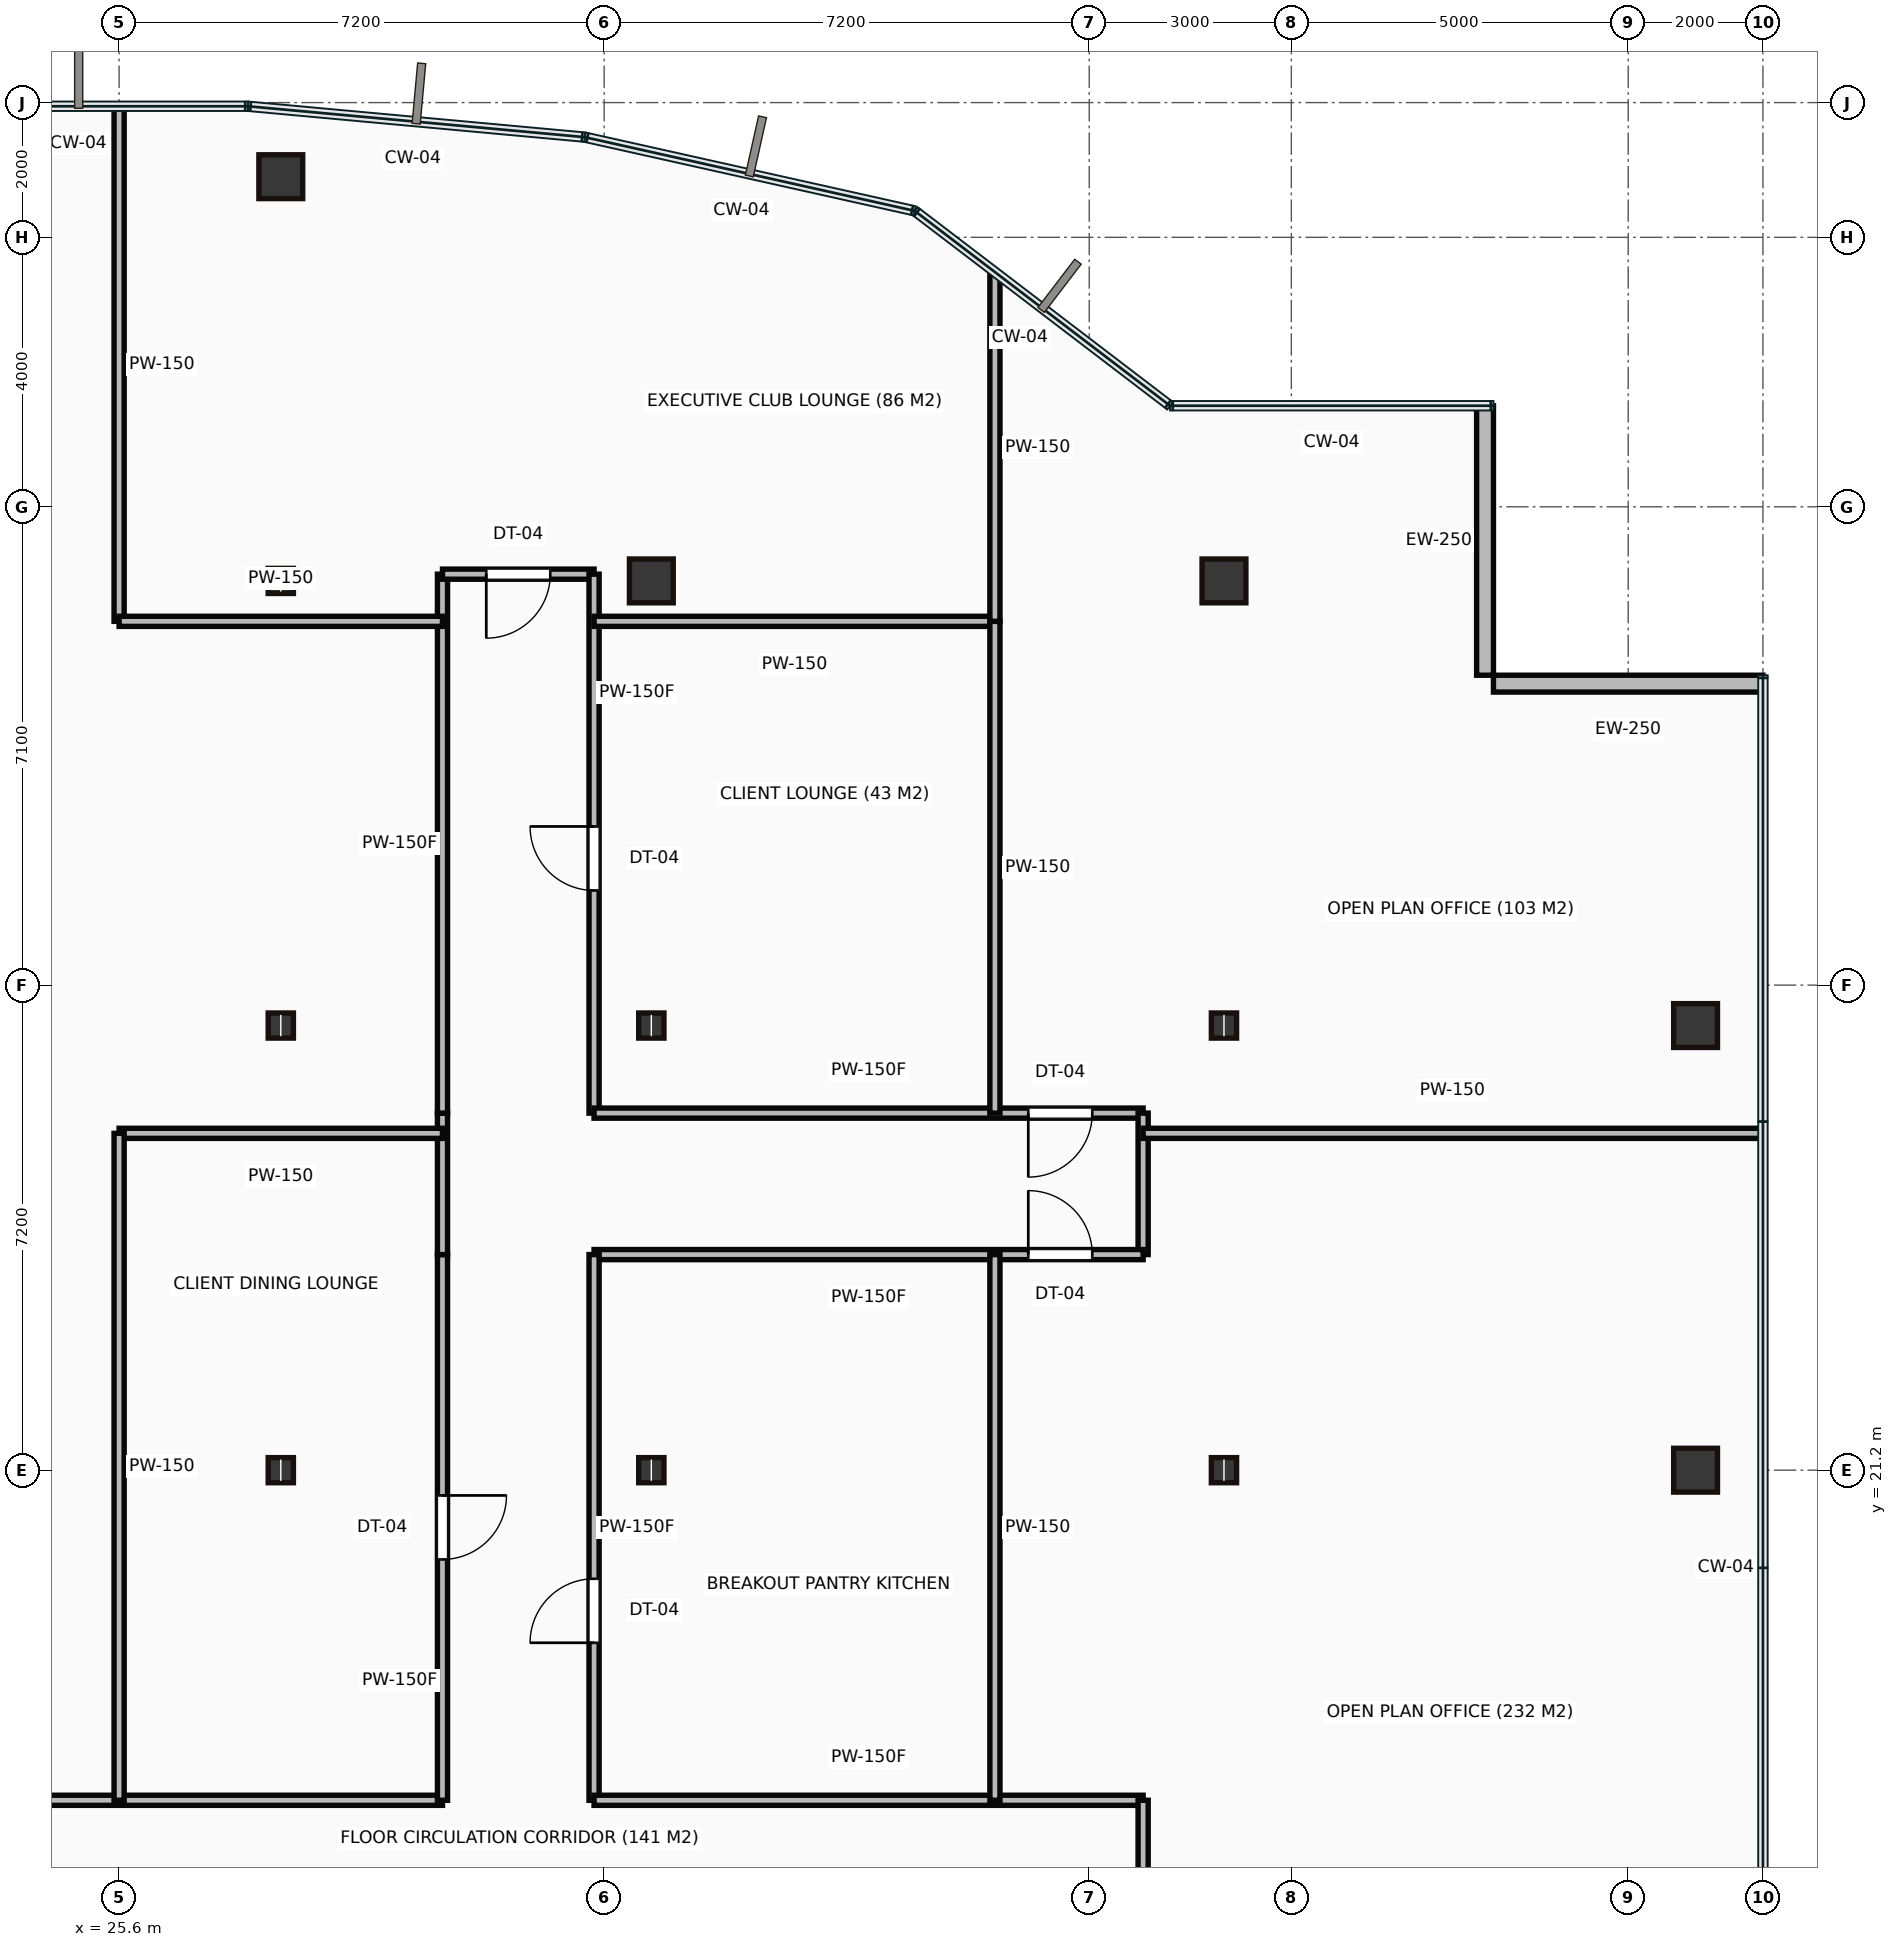
"""IFC4 building model, lengths in metres.
Left out: names, types, materials, properties, quantities, classifications, styles, units other than length and angle.
Written with IfcOpenShell. Run it as: python <this file> out.ifc"""

import sys

from ifc_helpers import new_model, si_unit, direction, frame, frame_2d, origin, origin_2d, place, context, subcontext, project, spatial, rectangle, hollow_rectangle, i_section, extrude, source, transform, mapped, element, fill, save


model = new_model("IFC4")
c1 = context("Model", 3, precision=1e-05, world=origin(), true_north=direction((0.0, 1.0)))
c2 = subcontext(c1, "Body", "Model", "MODEL_VIEW")
j1 = project(units=[si_unit("LENGTHUNIT", "METRE"), si_unit("PLANEANGLEUNIT", "RADIAN")], contexts=[c1])
p1 = place(None, origin())
s1 = spatial("IfcSite", under=j1, at=p1, CompositionType="ELEMENT")
p2 = place(p1, origin())
s2 = spatial("IfcBuilding", under=s1, at=p2, CompositionType="ELEMENT")
p3 = place(p2, frame((0.0, 0.0, 180.75)))
s3 = spatial("IfcBuildingStorey", under=s2, at=p3, CompositionType="ELEMENT", Elevation=180.75)
m1 = source(origin(), c2, "Body", "SweptSolid", [
    extrude(i_section(OverallWidth=0.374, OverallDepth=0.372, WebThickness=0.016, FlangeThickness=0.026, at=origin_2d()), origin(), (0.0, 0.0, 1.0), 3.65),
])
for number, where, z_axis, x_axis in (
    (1, (28.0, 21.2, 0.0), (0.0, 0.0, 1.0), (1.0, 0.0, 0.0)),
    (2, (28.0, 27.8, 0.0), (0.0, 0.0, 1.0), (1.0, 0.0, 0.0)),
    (3, (28.0, 34.4, 0.0), (0.0, 0.0, 1.0), (1.0, 0.0, 0.0)),
):
    element("IfcColumn", number, at=place(p3, frame(where, z_axis=z_axis, x_axis=x_axis)), inside=s3, PredefinedType="COLUMN", context=c2, shape_type="MappedRepresentation", body=[
        mapped(m1, transform((0.0, 0.0, 0.0))),
    ])
m2 = source(origin(), c2, "Body", "SweptSolid", [
    extrude(hollow_rectangle(XDim=0.65, YDim=0.65, WallThickness=0.032, at=origin_2d()), origin(), (0.0, 0.0, 1.0), 3.65),
])
p4 = place(p3, frame((28.0, 40.4, 0.0), z_axis=(0.0, 0.0, 1.0), x_axis=(1.0, 0.0, 0.0)))
e4 = element("IfcColumn", 4, at=p4, inside=s3, PredefinedType="COLUMN", context=c2, shape_type="MappedRepresentation", body=[
    mapped(m2, transform((0.0, 0.0, 0.0))),
])
for number, where, z_axis, x_axis in (
    (5, (33.5, 21.2, 0.0), (0.0, 0.0, 1.0), (1.0, 0.0, 0.0)),
    (6, (33.5, 27.8, 0.0), (0.0, 0.0, 1.0), (1.0, 0.0, 0.0)),
):
    element("IfcColumn", number, at=place(p3, frame(where, z_axis=z_axis, x_axis=x_axis)), inside=s3, PredefinedType="COLUMN", context=c2, shape_type="MappedRepresentation", body=[
        mapped(m1, transform((0.0, 0.0, 0.0))),
    ])
p5 = place(p3, frame((33.5, 34.4, 0.0), z_axis=(0.0, 0.0, 1.0), x_axis=(1.0, 0.0, 0.0)))
e7 = element("IfcColumn", 7, at=p5, inside=s3, PredefinedType="COLUMN", context=c2, shape_type="MappedRepresentation", body=[
    mapped(m2, transform((0.0, 0.0, 0.0))),
])
for number, where, z_axis, x_axis in (
    (8, (42.0, 21.2, 0.0), (0.0, 0.0, 1.0), (1.0, 0.0, 0.0)),
    (9, (42.0, 27.8, 0.0), (0.0, 0.0, 1.0), (1.0, 0.0, 0.0)),
):
    element("IfcColumn", number, at=place(p3, frame(where, z_axis=z_axis, x_axis=x_axis)), inside=s3, PredefinedType="COLUMN", context=c2, shape_type="MappedRepresentation", body=[
        mapped(m1, transform((0.0, 0.0, 0.0))),
    ])
for number, where, z_axis, x_axis in (
    (10, (42.0, 34.4, 0.0), (0.0, 0.0, 1.0), (1.0, 0.0, 0.0)),
    (11, (49.0, 21.2, 0.0), (0.0, 0.0, 1.0), (1.0, 0.0, 0.0)),
    (12, (49.0, 27.8, 0.0), (0.0, 0.0, 1.0), (1.0, 0.0, 0.0)),
):
    element("IfcColumn", number, at=place(p3, frame(where, z_axis=z_axis, x_axis=x_axis)), inside=s3, PredefinedType="COLUMN", context=c2, shape_type="MappedRepresentation", body=[
        mapped(m2, transform((0.0, 0.0, 0.0))),
    ])
m3 = source(origin(), c2, "Body", "SweptSolid", [
    extrude(rectangle(XDim=4.0, YDim=0.25, at=frame_2d((2.0, 0.0))), origin(), (0.0, 0.0, 1.0), 3.4),
])
for number, where, z_axis, x_axis in (
    (13, (50.0, 32.875, 0.0), (0.0, 0.0, 1.0), (-1.0, 0.0, 0.0)),
    (14, (45.875, 33.0, 0.0), (0.0, 0.0, 1.0), (0.0, 1.0, 0.0)),
):
    element("IfcWall", number, at=place(p3, frame(where, z_axis=z_axis, x_axis=x_axis)), inside=s3, PredefinedType="STANDARD", context=c2, shape_type="MappedRepresentation", body=[
        mapped(m3, transform((0.0, 0.0, 0.0))),
    ])
m4 = source(origin(), c2, "Body", "SweptSolid", [
    extrude(rectangle(XDim=25.8, YDim=0.15, at=frame_2d((12.9, 0.0))), origin(), (0.0, 0.0, 1.0), 3.4),
])
p6 = place(p3, frame((4.6, 16.3, 0.0), z_axis=(0.0, 0.0, 1.0), x_axis=(1.0, 0.0, 0.0)))
e15 = element("IfcWall", 15, at=p6, inside=s3, PredefinedType="PARTITIONING", context=c2, shape_type="MappedRepresentation", body=[
    mapped(m4, transform((0.0, 0.0, 0.0))),
])
p7 = place(p6, frame((3.555, 0.0, 0.0)))
e16 = element("IfcOpeningElement", 16, at=p7, cuts=e15, PredefinedType="OPENING", context=c2, shape_type="SweptSolid", body=[
    extrude(rectangle(XDim=0.95, YDim=2.15, at=frame_2d((0.475, 1.075))), frame((0.0, 0.085, 0.0), z_axis=(0.0, -1.0, 0.0), x_axis=(1.0, 0.0, 0.0)), (0.0, 0.0, 1.0), 0.17),
])
p8 = place(p6, frame((13.925, 0.0, 0.0)))
e17 = element("IfcOpeningElement", 17, at=p8, cuts=e15, PredefinedType="OPENING", context=c2, shape_type="SweptSolid", body=[
    extrude(rectangle(XDim=0.95, YDim=2.15, at=frame_2d((0.475, 1.075))), frame((0.0, 0.085, 0.0), z_axis=(0.0, -1.0, 0.0), x_axis=(1.0, 0.0, 0.0)), (0.0, 0.0, 1.0), 0.17),
])
m5 = source(origin(), c2, "Body", "SweptSolid", [
    extrude(rectangle(XDim=8.1, YDim=0.15, at=frame_2d((4.05, 0.0))), origin(), (0.0, 0.0, 1.0), 3.4),
])
p9 = place(p3, frame((30.4, 16.3, 0.0), z_axis=(0.0, 0.0, 1.0), x_axis=(0.0, 1.0, 0.0)))
e18 = element("IfcWall", 18, at=p9, inside=s3, PredefinedType="PARTITIONING", context=c2, shape_type="MappedRepresentation", body=[
    mapped(m5, transform((0.0, 0.0, 0.0))),
])
p10 = place(p9, frame((3.575, 0.0, 0.0)))
e19 = element("IfcOpeningElement", 19, at=p10, cuts=e18, PredefinedType="OPENING", context=c2, shape_type="SweptSolid", body=[
    extrude(rectangle(XDim=0.95, YDim=2.15, at=frame_2d((0.475, 1.075))), frame((0.0, 0.085, 0.0), z_axis=(0.0, -1.0, 0.0), x_axis=(1.0, 0.0, 0.0)), (0.0, 0.0, 1.0), 0.17),
])
m6 = source(origin(), c2, "Body", "SweptSolid", [
    extrude(rectangle(XDim=2.1, YDim=0.15, at=frame_2d((1.05, 0.0))), origin(), (0.0, 0.0, 1.0), 3.4),
])
p11 = place(p3, frame((30.4, 24.4, 0.0), z_axis=(0.0, 0.0, 1.0), x_axis=(0.0, 1.0, 0.0)))
e20 = element("IfcWall", 20, at=p11, inside=s3, PredefinedType="PARTITIONING", context=c2, shape_type="MappedRepresentation", body=[
    mapped(m6, transform((0.0, 0.0, 0.0))),
])
m7 = source(origin(), c2, "Body", "SweptSolid", [
    extrude(rectangle(XDim=8.0, YDim=0.15, at=frame_2d((4.0, 0.0))), origin(), (0.0, 0.0, 1.0), 3.4),
])
p12 = place(p3, frame((30.4, 26.5, 0.0), z_axis=(0.0, 0.0, 1.0), x_axis=(0.0, 1.0, 0.0)))
e21 = element("IfcWall", 21, at=p12, inside=s3, PredefinedType="PARTITIONING", context=c2, shape_type="MappedRepresentation", body=[
    mapped(m7, transform((0.0, 0.0, 0.0))),
])
m8 = source(origin(), c2, "Body", "SweptSolid", [
    extrude(rectangle(XDim=2.25, YDim=0.15, at=frame_2d((1.125, 0.0))), origin(), (0.0, 0.0, 1.0), 2.76),
])
p13 = place(p3, frame((30.4, 34.5, 0.0), z_axis=(0.0, 0.0, 1.0), x_axis=(1.0, 0.0, 0.0)))
e22 = element("IfcWall", 22, at=p13, inside=s3, PredefinedType="PARTITIONING", context=c2, shape_type="MappedRepresentation", body=[
    mapped(m8, transform((0.0, 0.0, 0.0))),
])
p14 = place(p13, frame((0.65, 0.0, 0.0)))
e23 = element("IfcOpeningElement", 23, at=p14, cuts=e22, PredefinedType="OPENING", context=c2, shape_type="SweptSolid", body=[
    extrude(rectangle(XDim=0.95, YDim=2.15, at=frame_2d((0.475, 1.075))), frame((0.0, 0.085, 0.0), z_axis=(0.0, -1.0, 0.0), x_axis=(1.0, 0.0, 0.0)), (0.0, 0.0, 1.0), 0.17),
])
p15 = place(p3, frame((32.65, 34.5, 0.0), z_axis=(0.0, 0.0, 1.0), x_axis=(0.0, -1.0, 0.0)))
e24 = element("IfcWall", 24, at=p15, inside=s3, PredefinedType="PARTITIONING", context=c2, shape_type="MappedRepresentation", body=[
    mapped(m7, transform((0.0, 0.0, 0.0))),
])
p16 = place(p15, frame((3.745, 0.0, 0.0)))
e25 = element("IfcOpeningElement", 25, at=p16, cuts=e24, PredefinedType="OPENING", context=c2, shape_type="SweptSolid", body=[
    extrude(rectangle(XDim=0.95, YDim=2.15, at=frame_2d((0.475, 1.075))), frame((0.0, 0.085, 0.0), z_axis=(0.0, -1.0, 0.0), x_axis=(1.0, 0.0, 0.0)), (0.0, 0.0, 1.0), 0.17),
])
m9 = source(origin(), c2, "Body", "SweptSolid", [
    extrude(rectangle(XDim=8.15, YDim=0.15, at=frame_2d((4.075, 0.0))), origin(), (0.0, 0.0, 1.0), 3.4),
])
p17 = place(p3, frame((32.65, 26.5, 0.0), z_axis=(0.0, 0.0, 1.0), x_axis=(1.0, 0.0, 0.0)))
e26 = element("IfcWall", 26, at=p17, inside=s3, PredefinedType="PARTITIONING", context=c2, shape_type="MappedRepresentation", body=[
    mapped(m9, transform((0.0, 0.0, 0.0))),
])
p18 = place(p17, frame((6.445, 0.0, 0.0)))
e27 = element("IfcOpeningElement", 27, at=p18, cuts=e26, PredefinedType="OPENING", context=c2, shape_type="SweptSolid", body=[
    extrude(rectangle(XDim=0.95, YDim=2.15, at=frame_2d((0.475, 1.075))), frame((0.0, 0.085, 0.0), z_axis=(0.0, -1.0, 0.0), x_axis=(1.0, 0.0, 0.0)), (0.0, 0.0, 1.0), 0.17),
])
p19 = place(p3, frame((40.8, 26.5, 0.0), z_axis=(0.0, 0.0, 1.0), x_axis=(0.0, -1.0, 0.0)))
e28 = element("IfcWall", 28, at=p19, inside=s3, PredefinedType="PARTITIONING", context=c2, shape_type="MappedRepresentation", body=[
    mapped(m6, transform((0.0, 0.0, 0.0))),
])
p20 = place(p3, frame((40.8, 24.4, 0.0), z_axis=(0.0, 0.0, 1.0), x_axis=(-1.0, 0.0, 0.0)))
e29 = element("IfcWall", 29, at=p20, inside=s3, PredefinedType="PARTITIONING", context=c2, shape_type="MappedRepresentation", body=[
    mapped(m9, transform((0.0, 0.0, 0.0))),
])
p21 = place(p20, frame((0.755, 0.0, 0.0)))
e30 = element("IfcOpeningElement", 30, at=p21, cuts=e29, PredefinedType="OPENING", context=c2, shape_type="SweptSolid", body=[
    extrude(rectangle(XDim=0.95, YDim=2.15, at=frame_2d((0.475, 1.075))), frame((0.0, 0.085, 0.0), z_axis=(0.0, -1.0, 0.0), x_axis=(1.0, 0.0, 0.0)), (0.0, 0.0, 1.0), 0.17),
])
p22 = place(p3, frame((32.65, 24.4, 0.0), z_axis=(0.0, 0.0, 1.0), x_axis=(0.0, -1.0, 0.0)))
e31 = element("IfcWall", 31, at=p22, inside=s3, PredefinedType="PARTITIONING", context=c2, shape_type="MappedRepresentation", body=[
    mapped(m5, transform((0.0, 0.0, 0.0))),
])
p23 = place(p22, frame((4.812, 0.0, 0.0)))
e32 = element("IfcOpeningElement", 32, at=p23, cuts=e31, PredefinedType="OPENING", context=c2, shape_type="SweptSolid", body=[
    extrude(rectangle(XDim=0.95, YDim=2.15, at=frame_2d((0.475, 1.075))), frame((0.0, 0.085, 0.0), z_axis=(0.0, -1.0, 0.0), x_axis=(1.0, 0.0, 0.0)), (0.0, 0.0, 1.0), 0.17),
])
p24 = place(p3, frame((32.65, 16.3, 0.0), z_axis=(0.0, 0.0, 1.0), x_axis=(1.0, 0.0, 0.0)))
e33 = element("IfcWall", 33, at=p24, inside=s3, PredefinedType="PARTITIONING", context=c2, shape_type="MappedRepresentation", body=[
    mapped(m9, transform((0.0, 0.0, 0.0))),
])
m10 = source(origin(), c2, "Body", "SweptSolid", [
    extrude(rectangle(XDim=2.3, YDim=0.15, at=frame_2d((1.15, 0.0))), origin(), (0.0, 0.0, 1.0), 3.4),
])
p25 = place(p3, frame((40.8, 16.3, 0.0), z_axis=(0.0, 0.0, 1.0), x_axis=(0.0, -1.0, 0.0)))
e34 = element("IfcWall", 34, at=p25, inside=s3, PredefinedType="PARTITIONING", context=c2, shape_type="MappedRepresentation", body=[
    mapped(m10, transform((0.0, 0.0, 0.0))),
])
m11 = source(origin(), c2, "Body", "SweptSolid", [
    extrude(rectangle(XDim=4.8, YDim=0.15, at=frame_2d((2.4, 0.0))), origin(), (0.0, 0.0, 1.0), 3.4),
])
p26 = place(p3, frame((30.4, 26.2, 0.0), z_axis=(0.0, 0.0, 1.0), x_axis=(-1.0, 0.0, 0.0)))
e35 = element("IfcWall", 35, at=p26, inside=s3, PredefinedType="PARTITIONING", context=c2, shape_type="MappedRepresentation", body=[
    mapped(m11, transform((0.0, 0.0, 0.0))),
])
m12 = source(origin(), c2, "Body", "SweptSolid", [
    extrude(rectangle(XDim=9.9, YDim=0.15, at=frame_2d((4.95, 0.0))), origin(), (0.0, 0.0, 1.0), 3.4),
])
p27 = place(p3, frame((25.6, 26.2, 0.0), z_axis=(0.0, 0.0, 1.0), x_axis=(0.0, -1.0, 0.0)))
e36 = element("IfcWall", 36, at=p27, inside=s3, PredefinedType="PARTITIONING", context=c2, shape_type="MappedRepresentation", body=[
    mapped(m12, transform((0.0, 0.0, 0.0))),
])
m13 = source(origin(), c2, "Body", "SweptSolid", [
    extrude(rectangle(XDim=7.625, YDim=0.15, at=frame_2d((3.813, 0.0))), origin(), (0.0, 0.0, 1.0), 3.4),
])
p28 = place(p3, frame((25.6, 41.426, 0.0), z_axis=(0.0, 0.0, 1.0), x_axis=(0.0, -1.0, 0.0)))
e37 = element("IfcWall", 37, at=p28, inside=s3, PredefinedType="PARTITIONING", context=c2, shape_type="MappedRepresentation", body=[
    mapped(m13, transform((0.0, 0.0, 0.0))),
])
p29 = place(p3, frame((25.6, 33.8, 0.0), z_axis=(0.0, 0.0, 1.0), x_axis=(1.0, 0.0, 0.0)))
e38 = element("IfcWall", 38, at=p29, inside=s3, PredefinedType="PARTITIONING", context=c2, shape_type="MappedRepresentation", body=[
    mapped(m11, transform((0.0, 0.0, 0.0))),
])
m14 = source(origin(), c2, "Body", "SweptSolid", [
    extrude(rectangle(XDim=5.95, YDim=0.15, at=frame_2d((2.975, 0.0))), origin(), (0.0, 0.0, 1.0), 3.4),
])
p30 = place(p3, frame((38.6, 33.8, 0.0), z_axis=(0.0, 0.0, 1.0), x_axis=(-1.0, 0.0, 0.0)))
e39 = element("IfcWall", 39, at=p30, inside=s3, PredefinedType="PARTITIONING", context=c2, shape_type="MappedRepresentation", body=[
    mapped(m14, transform((0.0, 0.0, 0.0))),
])
p31 = place(p3, frame((38.6, 24.4, 0.0), z_axis=(0.0, 0.0, 1.0), x_axis=(0.0, -1.0, 0.0)))
e40 = element("IfcWall", 40, at=p31, inside=s3, PredefinedType="PARTITIONING", context=c2, shape_type="MappedRepresentation", body=[
    mapped(m5, transform((0.0, 0.0, 0.0))),
])
m15 = source(origin(), c2, "Body", "SweptSolid", [
    extrude(rectangle(XDim=7.3, YDim=0.15, at=frame_2d((3.65, 0.0))), origin(), (0.0, 0.0, 1.0), 3.4),
])
p32 = place(p3, frame((38.6, 33.8, 0.0), z_axis=(0.0, 0.0, 1.0), x_axis=(0.0, -1.0, 0.0)))
e41 = element("IfcWall", 41, at=p32, inside=s3, PredefinedType="PARTITIONING", context=c2, shape_type="MappedRepresentation", body=[
    mapped(m15, transform((0.0, 0.0, 0.0))),
])
m16 = source(origin(), c2, "Body", "SweptSolid", [
    extrude(rectangle(XDim=5.159, YDim=0.15, at=frame_2d((2.58, 0.0))), origin(), (0.0, 0.0, 1.0), 3.4),
])
p33 = place(p3, frame((38.6, 38.959, 0.0), z_axis=(0.0, 0.0, 1.0), x_axis=(0.0, -1.0, 0.0)))
e42 = element("IfcWall", 42, at=p33, inside=s3, PredefinedType="PARTITIONING", context=c2, shape_type="MappedRepresentation", body=[
    mapped(m16, transform((0.0, 0.0, 0.0))),
])
m17 = source(origin(), c2, "Body", "SweptSolid", [
    extrude(rectangle(XDim=9.18, YDim=0.15, at=frame_2d((4.59, 0.0))), origin(), (0.0, 0.0, 1.0), 3.4),
])
p34 = place(p3, frame((40.8, 26.2, 0.0), z_axis=(0.0, 0.0, 1.0), x_axis=(1.0, 0.0, 0.0)))
e43 = element("IfcWall", 43, at=p34, inside=s3, PredefinedType="PARTITIONING", context=c2, shape_type="MappedRepresentation", body=[
    mapped(m17, transform((0.0, 0.0, 0.0))),
])
m18 = source(origin(), c2, "Body", "SweptSolid", [
    extrude(rectangle(XDim=0.95, YDim=2.15, at=frame_2d((0.475, 1.075))), frame((0.0, 0.025, 0.0), z_axis=(0.0, -1.0, 0.0), x_axis=(1.0, 0.0, 0.0)), (0.0, 0.0, 1.0), 0.05),
])
p35 = place(p10, origin())
e44 = element("IfcDoor", 44, at=p35, inside=s3, OperationType="SINGLE_SWING_RIGHT", PredefinedType="DOOR", context=c2, shape_type="MappedRepresentation", body=[
    mapped(m18, transform((0.0, 0.0, 0.0))),
])
fill(e19, e44)
p36 = place(p14, origin())
e45 = element("IfcDoor", 45, at=p36, inside=s3, OperationType="SINGLE_SWING_LEFT", PredefinedType="DOOR", context=c2, shape_type="MappedRepresentation", body=[
    mapped(m18, transform((0.0, 0.0, 0.0))),
])
fill(e23, e45)
p37 = place(p23, origin())
e46 = element("IfcDoor", 46, at=p37, inside=s3, OperationType="SINGLE_SWING_RIGHT", PredefinedType="DOOR", context=c2, shape_type="MappedRepresentation", body=[
    mapped(m18, transform((0.0, 0.0, 0.0))),
])
fill(e32, e46)
p38 = place(p16, origin())
e47 = element("IfcDoor", 47, at=p38, inside=s3, OperationType="SINGLE_SWING_LEFT", PredefinedType="DOOR", context=c2, shape_type="MappedRepresentation", body=[
    mapped(m18, transform((0.0, 0.0, 0.0))),
])
fill(e25, e47)
p39 = place(p21, origin())
e48 = element("IfcDoor", 48, at=p39, inside=s3, OperationType="SINGLE_SWING_RIGHT", PredefinedType="DOOR", context=c2, shape_type="MappedRepresentation", body=[
    mapped(m18, transform((0.0, 0.0, 0.0))),
])
fill(e30, e48)
p40 = place(p18, origin())
e49 = element("IfcDoor", 49, at=p40, inside=s3, OperationType="SINGLE_SWING_LEFT", PredefinedType="DOOR", context=c2, shape_type="MappedRepresentation", body=[
    mapped(m18, transform((0.0, 0.0, 0.0))),
])
fill(e27, e49)
save(model, sys.argv[1])
